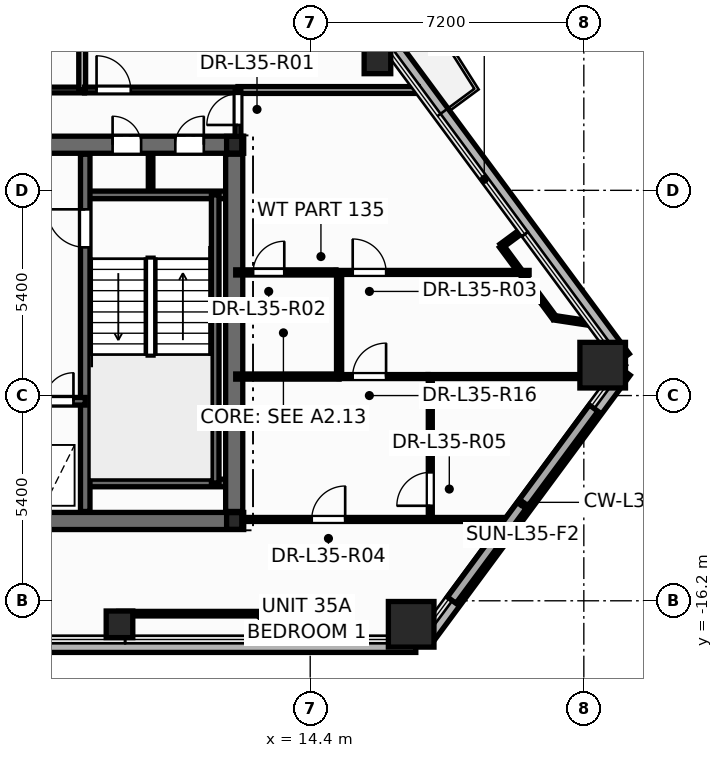
"""IFC4 building model, lengths in metres.
Left out: names, types, materials, properties, quantities, classifications, styles, units other than length and angle.
Written with IfcOpenShell. Run it as: python <this file> out.ifc"""

import sys

from ifc_helpers import new_model, si_unit, direction, frame, frame_2d, origin, origin_2d, place, context, subcontext, project, spatial, rectangle, hollow_rectangle, hollow_circle, i_section, extrude, element, fill, save


model = new_model("IFC4")
c1 = context("Model", 3, precision=1e-05, world=origin(), true_north=direction((0.0, 1.0)))
c2 = subcontext(c1, "Body", "Model", "MODEL_VIEW")
j1 = project(units=[si_unit("LENGTHUNIT", "METRE"), si_unit("PLANEANGLEUNIT", "RADIAN")], contexts=[c1])
p1 = place(None, origin())
s1 = spatial("IfcSite", under=j1, at=p1, CompositionType="ELEMENT")
p2 = place(p1, origin())
s2 = spatial("IfcBuilding", under=s1, at=p2, CompositionType="ELEMENT")
p3 = place(p2, frame((0.0, 0.0, 136.5)))
s3 = spatial("IfcBuildingStorey", under=s2, at=p3, CompositionType="ELEMENT", Elevation=136.5)
for number, where, z_axis, x_axis in (
    (1, (17.057, -16.819, 0.0), (0.0, 0.0, 1.0), (1.0, 0.0, 0.0)),
    (2, (22.096, -10.0, 0.0), (0.0, 0.0, 1.0), (1.0, 0.0, 0.0)),
):
    element("IfcColumn", number, at=place(p3, frame(where, z_axis=z_axis, x_axis=x_axis)), inside=s3, PredefinedType="COLUMN", context=c2, shape_type="SweptSolid", body=[
        extrude(hollow_rectangle(XDim=1.2, YDim=1.2, WallThickness=0.055, at=origin_2d()), origin(), (0.0, 0.0, 1.0), 3.6),
    ])
for number, where, z_axis, x_axis in (
    (3, (9.381, -16.819, 0.0), (0.0, 0.0, 1.0), (1.0, 0.0, 0.0)),
    (4, (16.169, -1.98, 0.0), (0.0, 0.0, 1.0), (1.0, 0.0, 0.0)),
):
    element("IfcColumn", number, at=place(p3, frame(where, z_axis=z_axis, x_axis=x_axis)), inside=s3, PredefinedType="COLUMN", context=c2, shape_type="SweptSolid", body=[
        extrude(hollow_circle(Radius=0.35, WallThickness=0.03, at=origin_2d()), origin(), (0.0, 0.0, 1.0), 3.6),
    ])
for number, where, z_axis, x_axis in (
    (5, (12.4, -14.1, 0.0), (0.0, 0.0, 1.0), (1.0, 0.0, 0.0)),
    (6, (12.4, -4.2, 0.0), (0.0, 0.0, 1.0), (1.0, 0.0, 0.0)),
):
    element("IfcColumn", number, at=place(p3, frame(where, z_axis=z_axis, x_axis=x_axis)), inside=s3, PredefinedType="COLUMN", context=c2, shape_type="SweptSolid", body=[
        extrude(i_section(OverallWidth=0.4, OverallDepth=0.44, WebThickness=0.028, FlangeThickness=0.04, at=origin_2d()), origin(), (0.0, 0.0, 1.0), 3.6),
    ])
p4 = place(p3, frame((-17.179, -17.379, -0.2), z_axis=(0.0, 0.0, 1.0), x_axis=(1.0, 0.0, 0.0)))
e7 = element("IfcWall", 7, at=p4, inside=s3, PredefinedType="PARAPET", context=c2, shape_type="SweptSolid", body=[
    extrude(rectangle(XDim=34.357, YDim=0.36, at=frame_2d((17.179, 0.0))), origin(), (0.0, 0.0, 1.0), 0.38),
])
p5 = place(p3, frame((17.435, -17.25, -0.2), z_axis=(0.0, 0.0, 1.0), x_axis=(0.59435368638, 0.804203764905, 0.0)))
e8 = element("IfcWall", 8, at=p5, inside=s3, PredefinedType="PARAPET", context=c2, shape_type="SweptSolid", body=[
    extrude(rectangle(XDim=8.816, YDim=0.36, at=frame_2d((4.408, 0.0))), origin(), (0.0, 0.0, 1.0), 0.38),
])
p6 = place(p3, frame((22.651, -9.809, -0.2), z_axis=(0.0, 0.0, 1.0), x_axis=(-0.594348443541, 0.804207639643, 0.0)))
e9 = element("IfcWall", 9, at=p6, inside=s3, PredefinedType="PARAPET", context=c2, shape_type="SweptSolid", body=[
    extrude(rectangle(XDim=11.92, YDim=0.36, at=frame_2d((5.96, 0.0))), origin(), (0.0, 0.0, 1.0), 0.38),
])
p7 = place(p3, frame((10.2, -5.52, 0.0), z_axis=(0.0, 0.0, 1.0), x_axis=(0.0, 1.0, 0.0)))
e10 = element("IfcWall", 10, at=p7, inside=s3, PredefinedType="PARTITIONING", context=c2, shape_type="SweptSolid", body=[
    extrude(rectangle(XDim=1.12, YDim=0.12, at=frame_2d((0.56, 0.0))), origin(), (0.0, 0.0, 1.0), 3.35),
])
p8 = place(p3, frame((-12.65, -14.1, 0.0), z_axis=(0.0, 0.0, 1.0), x_axis=(1.0, 0.0, 0.0)))
e11 = element("IfcWall", 11, at=p8, inside=s3, PredefinedType="SHEAR", context=c2, shape_type="SweptSolid", body=[
    extrude(rectangle(XDim=25.3, YDim=0.45, at=frame_2d((12.65, 0.0))), origin(), (0.0, 0.0, 1.0), 3.6),
])
p9 = place(p3, frame((-12.65, -4.2, 0.0), z_axis=(0.0, 0.0, 1.0), x_axis=(1.0, 0.0, 0.0)))
e12 = element("IfcWall", 12, at=p9, inside=s3, PredefinedType="SHEAR", context=c2, shape_type="SweptSolid", body=[
    extrude(rectangle(XDim=25.3, YDim=0.45, at=frame_2d((12.65, 0.0))), origin(), (0.0, 0.0, 1.0), 3.6),
])
p10 = place(p9, frame((0.95, 0.0, 0.0)))
e13 = element("IfcOpeningElement", 13, at=p10, cuts=e12, PredefinedType="OPENING", context=c2, shape_type="SweptSolid", body=[
    extrude(rectangle(XDim=0.756, YDim=2.054, at=frame_2d((0.375, 1.027))), frame((0.0, 0.235, 0.0), z_axis=(0.0, -1.0, 0.0), x_axis=(1.0, 0.0, 0.0)), (0.0, 0.0, 1.0), 0.47),
])
p11 = place(p9, frame((2.6, 0.0, 0.0)))
e14 = element("IfcOpeningElement", 14, at=p11, cuts=e12, PredefinedType="OPENING", context=c2, shape_type="SweptSolid", body=[
    extrude(rectangle(XDim=0.756, YDim=2.054, at=frame_2d((0.375, 1.027))), frame((0.0, 0.235, 0.0), z_axis=(0.0, -1.0, 0.0), x_axis=(1.0, 0.0, 0.0)), (0.0, 0.0, 1.0), 0.47),
])
p12 = place(p9, frame((21.85, 0.0, 0.0)))
e15 = element("IfcOpeningElement", 15, at=p12, cuts=e12, PredefinedType="OPENING", context=c2, shape_type="SweptSolid", body=[
    extrude(rectangle(XDim=0.756, YDim=2.054, at=frame_2d((0.375, 1.027))), frame((0.0, 0.235, 0.0), z_axis=(0.0, -1.0, 0.0), x_axis=(1.0, 0.0, 0.0)), (0.0, 0.0, 1.0), 0.47),
])
p13 = place(p9, frame((23.5, 0.0, 0.0)))
e16 = element("IfcOpeningElement", 16, at=p13, cuts=e12, PredefinedType="OPENING", context=c2, shape_type="SweptSolid", body=[
    extrude(rectangle(XDim=0.756, YDim=2.054, at=frame_2d((0.375, 1.027))), frame((0.0, 0.235, 0.0), z_axis=(0.0, -1.0, 0.0), x_axis=(1.0, 0.0, 0.0)), (0.0, 0.0, 1.0), 0.47),
])
p14 = place(p9, frame((5.85, 0.0, 0.0)))
e17 = element("IfcOpeningElement", 17, at=p14, cuts=e12, PredefinedType="OPENING", context=c2, shape_type="SweptSolid", body=[
    extrude(rectangle(XDim=1.006, YDim=2.104, at=frame_2d((0.5, 1.052))), frame((0.0, 0.235, 0.0), z_axis=(0.0, -1.0, 0.0), x_axis=(1.0, 0.0, 0.0)), (0.0, 0.0, 1.0), 0.47),
])
p15 = place(p9, frame((10.35, 0.0, 0.0)))
e18 = element("IfcOpeningElement", 18, at=p15, cuts=e12, PredefinedType="OPENING", context=c2, shape_type="SweptSolid", body=[
    extrude(rectangle(XDim=1.406, YDim=2.154, at=frame_2d((0.7, 1.077))), frame((0.0, 0.235, 0.0), z_axis=(0.0, -1.0, 0.0), x_axis=(1.0, 0.0, 0.0)), (0.0, 0.0, 1.0), 0.47),
])
p16 = place(p9, frame((18.45, 0.0, 0.0)))
e19 = element("IfcOpeningElement", 19, at=p16, cuts=e12, PredefinedType="OPENING", context=c2, shape_type="SweptSolid", body=[
    extrude(rectangle(XDim=1.006, YDim=2.104, at=frame_2d((0.5, 1.052))), frame((0.0, 0.235, 0.0), z_axis=(0.0, -1.0, 0.0), x_axis=(1.0, 0.0, 0.0)), (0.0, 0.0, 1.0), 0.47),
])
for number, where, z_axis, x_axis in (
    (20, (8.48, -5.52, 0.0), (0.0, 0.0, 1.0), (1.0, 0.0, 0.0)),
    (21, (8.48, -13.1, 0.0), (0.0, 0.0, 1.0), (1.0, 0.0, 0.0)),
):
    element("IfcWall", number, at=place(p3, frame(where, z_axis=z_axis, x_axis=x_axis)), inside=s3, PredefinedType="SOLIDWALL", context=c2, shape_type="SweptSolid", body=[
        extrude(rectangle(XDim=3.87, YDim=0.2, at=frame_2d((1.935, 0.0))), origin(), (0.0, 0.0, 1.0), 3.6),
    ])
p17 = place(p3, frame((11.9, -13.1, 0.0), z_axis=(0.0, 0.0, 1.0), x_axis=(0.0, 1.0, 0.0)))
e22 = element("IfcWall", 22, at=p17, inside=s3, PredefinedType="SOLIDWALL", context=c2, shape_type="SweptSolid", body=[
    extrude(rectangle(XDim=7.58, YDim=0.2, at=frame_2d((3.79, 0.0))), origin(), (0.0, 0.0, 1.0), 3.6),
])
p18 = place(p3, frame((8.48, -13.85, 0.0), z_axis=(0.0, 0.0, 1.0), x_axis=(0.0, 1.0, 0.0)))
e23 = element("IfcWall", 23, at=p18, inside=s3, PredefinedType="SHEAR", context=c2, shape_type="SweptSolid", body=[
    extrude(rectangle(XDim=9.4, YDim=0.25, at=frame_2d((4.7, 0.0))), origin(), (0.0, 0.0, 1.0), 3.6),
])
p19 = place(p18, frame((6.95, 0.0, 0.0)))
e24 = element("IfcOpeningElement", 24, at=p19, cuts=e23, PredefinedType="OPENING", context=c2, shape_type="SweptSolid", body=[
    extrude(rectangle(XDim=1.006, YDim=2.104, at=frame_2d((0.5, 1.052))), frame((0.0, 0.135, 0.0), z_axis=(0.0, -1.0, 0.0), x_axis=(1.0, 0.0, 0.0)), (0.0, 0.0, 1.0), 0.27),
])
p20 = place(p3, frame((5.12, -10.95, 0.0), z_axis=(0.0, 0.0, 1.0), x_axis=(1.0, 0.0, 0.0)))
e25 = element("IfcWall", 25, at=p20, inside=s3, PredefinedType="SOLIDWALL", context=c2, shape_type="SweptSolid", body=[
    extrude(rectangle(XDim=3.36, YDim=0.2, at=frame_2d((1.68, 0.0))), origin(), (0.0, 0.0, 1.0), 3.6),
])
p21 = place(p20, frame((0.42, 0.0, 0.0)))
e26 = element("IfcOpeningElement", 26, at=p21, cuts=e25, PredefinedType="OPENING", context=c2, shape_type="SweptSolid", body=[
    extrude(rectangle(XDim=1.106, YDim=2.104, at=frame_2d((0.55, 1.052))), frame((0.0, 0.11, 0.0), z_axis=(0.0, -1.0, 0.0), x_axis=(1.0, 0.0, 0.0)), (0.0, 0.0, 1.0), 0.22),
])
p22 = place(p20, frame((2.3, 0.0, 0.0)))
e27 = element("IfcOpeningElement", 27, at=p22, cuts=e25, PredefinedType="OPENING", context=c2, shape_type="SweptSolid", body=[
    extrude(rectangle(XDim=0.756, YDim=2.054, at=frame_2d((0.375, 1.027))), frame((0.0, 0.11, 0.0), z_axis=(0.0, -1.0, 0.0), x_axis=(1.0, 0.0, 0.0)), (0.0, 0.0, 1.0), 0.22),
])
p23 = place(p3, frame((12.4, -13.85, 0.0), z_axis=(0.0, 0.0, 1.0), x_axis=(0.0, 1.0, 0.0)))
e28 = element("IfcWall", 28, at=p23, inside=s3, PredefinedType="SHEAR", context=c2, shape_type="SweptSolid", body=[
    extrude(rectangle(XDim=9.4, YDim=0.45, at=frame_2d((4.7, 0.0))), origin(), (0.0, 0.0, 1.0), 3.6),
])
p24 = place(p3, frame((12.66, -14.06, 0.0), z_axis=(0.0, 0.0, 1.0), x_axis=(1.0, 0.0, 0.0)))
e29 = element("IfcWall", 29, at=p24, inside=s3, PredefinedType="PARTITIONING", context=c2, shape_type="SweptSolid", body=[
    extrude(rectangle(XDim=6.933, YDim=0.105, at=frame_2d((3.467, 0.0))), origin(), (0.0, 0.0, 1.0), 2.792),
])
p25 = place(p24, frame((1.78, 0.0, 0.0)))
e30 = element("IfcOpeningElement", 30, at=p25, cuts=e29, PredefinedType="OPENING", context=c2, shape_type="SweptSolid", body=[
    extrude(rectangle(XDim=0.886, YDim=2.104, at=frame_2d((0.44, 1.052))), frame((0.0, 0.062, 0.0), z_axis=(0.0, -1.0, 0.0), x_axis=(1.0, 0.0, 0.0)), (0.0, 0.0, 1.0), 0.125),
])
p26 = place(p3, frame((2.36, -2.76, 0.0), z_axis=(0.0, 0.0, 1.0), x_axis=(1.0, 0.0, 0.0)))
e31 = element("IfcWall", 31, at=p26, inside=s3, PredefinedType="PARTITIONING", context=c2, shape_type="SweptSolid", body=[
    extrude(rectangle(XDim=6.1, YDim=0.15, at=frame_2d((3.05, 0.0))), origin(), (0.0, 0.0, 1.0), 2.325),
])
p27 = place(p26, frame((0.358, 0.0, 0.0)))
e32 = element("IfcOpeningElement", 32, at=p27, cuts=e31, PredefinedType="OPENING", context=c2, shape_type="SweptSolid", body=[
    extrude(rectangle(XDim=0.906, YDim=2.104, at=frame_2d((0.45, 1.052))), frame((0.0, 0.085, 0.0), z_axis=(0.0, -1.0, 0.0), x_axis=(1.0, 0.0, 0.0)), (0.0, 0.0, 1.0), 0.17),
])
p28 = place(p3, frame((15.08, -7.56, 0.0), z_axis=(0.0, 0.0, 1.0), x_axis=(1.0, 0.0, 0.0)))
e33 = element("IfcWall", 33, at=p28, inside=s3, PredefinedType="PARTITIONING", context=c2, shape_type="SweptSolid", body=[
    extrude(rectangle(XDim=5.08, YDim=0.105, at=frame_2d((2.54, 0.0))), origin(), (0.0, 0.0, 1.0), 2.325),
])
p29 = place(p28, frame((0.438, 0.0, 0.0)))
e34 = element("IfcOpeningElement", 34, at=p29, cuts=e33, PredefinedType="OPENING", context=c2, shape_type="SweptSolid", body=[
    extrude(rectangle(XDim=0.886, YDim=2.104, at=frame_2d((0.44, 1.052))), frame((0.0, 0.062, 0.0), z_axis=(0.0, -1.0, 0.0), x_axis=(1.0, 0.0, 0.0)), (0.0, 0.0, 1.0), 0.125),
])
p30 = place(p3, frame((17.5, -10.3, 0.0), z_axis=(0.0, 0.0, 1.0), x_axis=(1.0, 0.0, 0.0)))
e35 = element("IfcWall", 35, at=p30, inside=s3, PredefinedType="PARTITIONING", context=c2, shape_type="SweptSolid", body=[
    extrude(rectangle(XDim=4.872, YDim=0.105, at=frame_2d((2.436, 0.0))), origin(), (0.0, 0.0, 1.0), 2.792),
])
p31 = place(p3, frame((8.4, -2.76, 0.0), z_axis=(0.0, 0.0, 1.0), x_axis=(0.0, 1.0, 0.0)))
e36 = element("IfcWall", 36, at=p31, inside=s3, PredefinedType="PARTITIONING", context=c2, shape_type="SweptSolid", body=[
    extrude(rectangle(XDim=7.56, YDim=0.18, at=frame_2d((3.78, 0.0))), origin(), (0.0, 0.0, 1.0), 2.617),
])
p32 = place(p3, frame((12.5, -2.76, 0.0), z_axis=(0.0, 0.0, 1.0), x_axis=(1.0, 0.0, 0.0)))
e37 = element("IfcWall", 37, at=p32, inside=s3, PredefinedType="PARTITIONING", context=c2, shape_type="SweptSolid", body=[
    extrude(rectangle(XDim=4.743, YDim=0.18, at=frame_2d((2.371, 0.0))), origin(), (0.0, 0.0, 1.0), 2.792),
])
p33 = place(p3, frame((8.462, -2.76, 0.0), z_axis=(0.0, 0.0, 1.0), x_axis=(1.0, 0.0, 0.0)))
e38 = element("IfcWall", 38, at=p33, inside=s3, PredefinedType="PARTITIONING", context=c2, shape_type="SweptSolid", body=[
    extrude(rectangle(XDim=4.038, YDim=0.15, at=frame_2d((2.019, 0.0))), origin(), (0.0, 0.0, 1.0), 3.35),
])
p34 = place(p33, frame((0.316, 0.0, 0.0)))
e39 = element("IfcOpeningElement", 39, at=p34, cuts=e38, PredefinedType="OPENING", context=c2, shape_type="SweptSolid", body=[
    extrude(rectangle(XDim=0.906, YDim=2.104, at=frame_2d((0.45, 1.052))), frame((0.0, 0.085, 0.0), z_axis=(0.0, -1.0, 0.0), x_axis=(1.0, 0.0, 0.0)), (0.0, 0.0, 1.0), 0.17),
])
p35 = place(p3, frame((17.56, -14.06, 0.0), z_axis=(0.0, 0.0, 1.0), x_axis=(0.0, 1.0, 0.0)))
e40 = element("IfcWall", 40, at=p35, inside=s3, PredefinedType="PARTITIONING", context=c2, shape_type="SweptSolid", body=[
    extrude(rectangle(XDim=3.76, YDim=0.105, at=frame_2d((1.88, 0.0))), origin(), (0.0, 0.0, 1.0), 3.35),
])
p36 = place(p35, frame((0.36, 0.0, 0.0)))
e41 = element("IfcOpeningElement", 41, at=p36, cuts=e40, PredefinedType="OPENING", context=c2, shape_type="SweptSolid", body=[
    extrude(rectangle(XDim=0.886, YDim=2.104, at=frame_2d((0.44, 1.052))), frame((0.0, 0.062, 0.0), z_axis=(0.0, -1.0, 0.0), x_axis=(1.0, 0.0, 0.0)), (0.0, 0.0, 1.0), 0.125),
])
p37 = place(p3, frame((9.358, -16.539, 0.0), z_axis=(0.0, 0.0, 1.0), x_axis=(1.0, 0.0, 0.0)))
e42 = element("IfcWall", 42, at=p37, inside=s3, PredefinedType="PARTITIONING", context=c2, shape_type="SweptSolid", body=[
    extrude(rectangle(XDim=3.693, YDim=0.12, at=frame_2d((1.847, 0.0))), origin(), (0.0, 0.0, 1.0), 2.792),
])
p38 = place(p3, frame((12.44, -7.56, 0.0), z_axis=(0.0, 0.0, 1.0), x_axis=(1.0, 0.0, 0.0)))
e43 = element("IfcWall", 43, at=p38, inside=s3, PredefinedType="PARTITIONING", context=c2, shape_type="SweptSolid", body=[
    extrude(rectangle(XDim=2.638, YDim=0.135, at=frame_2d((1.319, 0.0))), origin(), (0.0, 0.0, 1.0), 2.792),
])
p39 = place(p38, frame((0.458, 0.0, 0.0)))
e44 = element("IfcOpeningElement", 44, at=p39, cuts=e43, PredefinedType="OPENING", context=c2, shape_type="SweptSolid", body=[
    extrude(rectangle(XDim=0.826, YDim=2.104, at=frame_2d((0.41, 1.052))), frame((0.0, 0.078, 0.0), z_axis=(0.0, -1.0, 0.0), x_axis=(1.0, 0.0, 0.0)), (0.0, 0.0, 1.0), 0.155),
])
p40 = place(p3, frame((15.16, -10.3, 0.0), z_axis=(0.0, 0.0, 1.0), x_axis=(0.0, 1.0, 0.0)))
e45 = element("IfcWall", 45, at=p40, inside=s3, PredefinedType="PARTITIONING", context=c2, shape_type="SweptSolid", body=[
    extrude(rectangle(XDim=2.74, YDim=0.135, at=frame_2d((1.37, 0.0))), origin(), (0.0, 0.0, 1.0), 3.35),
])
p41 = place(p3, frame((12.44, -10.3, 0.0), z_axis=(0.0, 0.0, 1.0), x_axis=(1.0, 0.0, 0.0)))
e46 = element("IfcWall", 46, at=p41, inside=s3, PredefinedType="PARTITIONING", context=c2, shape_type="SweptSolid", body=[
    extrude(rectangle(XDim=2.72, YDim=0.135, at=frame_2d((1.36, 0.0))), origin(), (0.0, 0.0, 1.0), 2.792),
])
p42 = place(p3, frame((15.16, -10.3, 0.0), z_axis=(0.0, 0.0, 1.0), x_axis=(1.0, 0.0, 0.0)))
e47 = element("IfcWall", 47, at=p42, inside=s3, PredefinedType="PARTITIONING", context=c2, shape_type="SweptSolid", body=[
    extrude(rectangle(XDim=2.338, YDim=0.105, at=frame_2d((1.169, 0.0))), origin(), (0.0, 0.0, 1.0), 3.35),
])
p43 = place(p42, frame((0.356, 0.0, 0.0)))
e48 = element("IfcOpeningElement", 48, at=p43, cuts=e47, PredefinedType="OPENING", context=c2, shape_type="SweptSolid", body=[
    extrude(rectangle(XDim=0.886, YDim=2.104, at=frame_2d((0.44, 1.052))), frame((0.0, 0.062, 0.0), z_axis=(0.0, -1.0, 0.0), x_axis=(1.0, 0.0, 0.0)), (0.0, 0.0, 1.0), 0.125),
])
p44 = place(p3, frame((20.827, -8.754, 0.0), z_axis=(0.0, 0.0, 1.0), x_axis=(-0.594335579712, 0.804217146477, 0.0)))
e49 = element("IfcWall", 49, at=p44, inside=s3, PredefinedType="PARTITIONING", context=c2, shape_type="SweptSolid", body=[
    extrude(rectangle(XDim=2.351, YDim=0.12, at=frame_2d((1.175, 0.0))), origin(), (0.0, 0.0, 1.0), 3.35),
])
p45 = place(p3, frame((12.5, -4.24, 0.0), z_axis=(0.0, 0.0, 1.0), x_axis=(0.0, 1.0, 0.0)))
e50 = element("IfcWall", 50, at=p45, inside=s3, PredefinedType="PARTITIONING", context=c2, shape_type="SweptSolid", body=[
    extrude(rectangle(XDim=1.48, YDim=0.15, at=frame_2d((0.74, 0.0))), origin(), (0.0, 0.0, 1.0), 2.325),
])
p46 = place(p45, frame((0.56, 0.0, 0.0)))
e51 = element("IfcOpeningElement", 51, at=p46, cuts=e50, PredefinedType="OPENING", context=c2, shape_type="SweptSolid", body=[
    extrude(rectangle(XDim=0.826, YDim=2.104, at=frame_2d((0.41, 1.052))), frame((0.0, 0.085, 0.0), z_axis=(0.0, -1.0, 0.0), x_axis=(1.0, 0.0, 0.0)), (0.0, 0.0, 1.0), 0.17),
])
for number, where, z_axis, x_axis in (
    (52, (21.667, -8.881, 0.0), (0.0, 0.0, 1.0), (-0.989, 0.15, 0.0)),
    (53, (13.052, -16.539, 0.0), (0.0, 0.0, 1.0), (0.701, -0.713, 0.0)),
):
    element("IfcWall", number, at=place(p3, frame(where, z_axis=z_axis, x_axis=x_axis)), inside=s3, PredefinedType="PARTITIONING", context=c2, shape_type="SweptSolid", body=[
        extrude(rectangle(XDim=0.849, YDim=0.12, at=frame_2d((0.425, 0.0))), origin(), (0.0, 0.0, 1.0), 2.792),
    ])
p47 = place(p3, frame((19.43, -6.864, 0.0), z_axis=(0.0, 0.0, 1.0), x_axis=(0.804221577226, 0.594329584257, 0.0)))
e54 = element("IfcWall", 54, at=p47, inside=s3, PredefinedType="PARTITIONING", context=c2, shape_type="SweptSolid", body=[
    extrude(rectangle(XDim=0.67, YDim=0.12, at=frame_2d((0.335, 0.0))), origin(), (0.0, 0.0, 1.0), 2.792),
])
p48 = place(p3, frame((9.358, -17.209, 0.0), z_axis=(0.0, 0.0, 1.0), x_axis=(0.0, 1.0, 0.0)))
e55 = element("IfcWall", 55, at=p48, inside=s3, PredefinedType="PARTITIONING", context=c2, shape_type="SweptSolid", body=[
    extrude(rectangle(XDim=0.67, YDim=0.12, at=frame_2d((0.335, 0.0))), origin(), (0.0, 0.0, 1.0), 2.792),
])
p49 = place(p19, origin())
e56 = element("IfcDoor", 56, at=p49, inside=s3, OperationType="SINGLE_SWING_RIGHT", PredefinedType="DOOR", context=c2, shape_type="SweptSolid", body=[
    extrude(rectangle(XDim=1.0, YDim=2.1, at=frame_2d((0.5, 1.05))), frame((0.0, 0.025, 0.0), z_axis=(0.0, -1.0, 0.0), x_axis=(1.0, 0.0, 0.0)), (0.0, 0.0, 1.0), 0.05),
])
fill(e24, e56)
p50 = place(p22, origin())
e57 = element("IfcDoor", 57, at=p50, inside=s3, OperationType="SINGLE_SWING_RIGHT", PredefinedType="DOOR", context=c2, shape_type="SweptSolid", body=[
    extrude(rectangle(XDim=0.75, YDim=2.05, at=frame_2d((0.375, 1.025))), frame((0.0, 0.025, 0.0), z_axis=(0.0, -1.0, 0.0), x_axis=(1.0, 0.0, 0.0)), (0.0, 0.0, 1.0), 0.05),
])
fill(e27, e57)
p51 = place(p12, origin())
e58 = element("IfcDoor", 58, at=p51, inside=s3, OperationType="SINGLE_SWING_LEFT", PredefinedType="DOOR", context=c2, shape_type="SweptSolid", body=[
    extrude(rectangle(XDim=0.75, YDim=2.05, at=frame_2d((0.375, 1.025))), frame((0.0, 0.025, 0.0), z_axis=(0.0, -1.0, 0.0), x_axis=(1.0, 0.0, 0.0)), (0.0, 0.0, 1.0), 0.05),
])
fill(e15, e58)
p52 = place(p13, origin())
e59 = element("IfcDoor", 59, at=p52, inside=s3, OperationType="SINGLE_SWING_RIGHT", PredefinedType="DOOR", context=c2, shape_type="SweptSolid", body=[
    extrude(rectangle(XDim=0.75, YDim=2.05, at=frame_2d((0.375, 1.025))), frame((0.0, 0.025, 0.0), z_axis=(0.0, -1.0, 0.0), x_axis=(1.0, 0.0, 0.0)), (0.0, 0.0, 1.0), 0.05),
])
fill(e16, e59)
p53 = place(p46, origin())
e60 = element("IfcDoor", 60, at=p53, inside=s3, OperationType="SINGLE_SWING_LEFT", PredefinedType="DOOR", context=c2, shape_type="SweptSolid", body=[
    extrude(rectangle(XDim=0.82, YDim=2.1, at=frame_2d((0.41, 1.05))), frame((0.0, 0.025, 0.0), z_axis=(0.0, -1.0, 0.0), x_axis=(1.0, 0.0, 0.0)), (0.0, 0.0, 1.0), 0.05),
])
fill(e51, e60)
p54 = place(p39, origin())
e61 = element("IfcDoor", 61, at=p54, inside=s3, OperationType="SINGLE_SWING_RIGHT", PredefinedType="DOOR", context=c2, shape_type="SweptSolid", body=[
    extrude(rectangle(XDim=0.82, YDim=2.1, at=frame_2d((0.41, 1.05))), frame((0.0, 0.025, 0.0), z_axis=(0.0, -1.0, 0.0), x_axis=(1.0, 0.0, 0.0)), (0.0, 0.0, 1.0), 0.05),
])
fill(e44, e61)
p55 = place(p29, origin())
e62 = element("IfcDoor", 62, at=p55, inside=s3, OperationType="SINGLE_SWING_LEFT", PredefinedType="DOOR", context=c2, shape_type="SweptSolid", body=[
    extrude(rectangle(XDim=0.88, YDim=2.1, at=frame_2d((0.44, 1.05))), frame((0.0, 0.025, 0.0), z_axis=(0.0, -1.0, 0.0), x_axis=(1.0, 0.0, 0.0)), (0.0, 0.0, 1.0), 0.05),
])
fill(e34, e62)
p56 = place(p25, origin())
e63 = element("IfcDoor", 63, at=p56, inside=s3, OperationType="SINGLE_SWING_RIGHT", PredefinedType="DOOR", context=c2, shape_type="SweptSolid", body=[
    extrude(rectangle(XDim=0.88, YDim=2.1, at=frame_2d((0.44, 1.05))), frame((0.0, 0.025, 0.0), z_axis=(0.0, -1.0, 0.0), x_axis=(1.0, 0.0, 0.0)), (0.0, 0.0, 1.0), 0.05),
])
fill(e30, e63)
p57 = place(p36, origin())
e64 = element("IfcDoor", 64, at=p57, inside=s3, OperationType="SINGLE_SWING_LEFT", PredefinedType="DOOR", context=c2, shape_type="SweptSolid", body=[
    extrude(rectangle(XDim=0.88, YDim=2.1, at=frame_2d((0.44, 1.05))), frame((0.0, 0.025, 0.0), z_axis=(0.0, -1.0, 0.0), x_axis=(1.0, 0.0, 0.0)), (0.0, 0.0, 1.0), 0.05),
])
fill(e41, e64)
p58 = place(p34, origin())
e65 = element("IfcDoor", 65, at=p58, inside=s3, OperationType="SINGLE_SWING_LEFT", PredefinedType="DOOR", context=c2, shape_type="SweptSolid", body=[
    extrude(rectangle(XDim=0.9, YDim=2.1, at=frame_2d((0.45, 1.05))), frame((0.0, 0.025, 0.0), z_axis=(0.0, -1.0, 0.0), x_axis=(1.0, 0.0, 0.0)), (0.0, 0.0, 1.0), 0.05),
])
fill(e39, e65)
p59 = place(p43, origin())
e66 = element("IfcDoor", 66, at=p59, inside=s3, OperationType="SINGLE_SWING_RIGHT", PredefinedType="DOOR", context=c2, shape_type="SweptSolid", body=[
    extrude(rectangle(XDim=0.88, YDim=2.1, at=frame_2d((0.44, 1.05))), frame((0.0, 0.025, 0.0), z_axis=(0.0, -1.0, 0.0), x_axis=(1.0, 0.0, 0.0)), (0.0, 0.0, 1.0), 0.05),
])
fill(e48, e66)
save(model, sys.argv[1])
